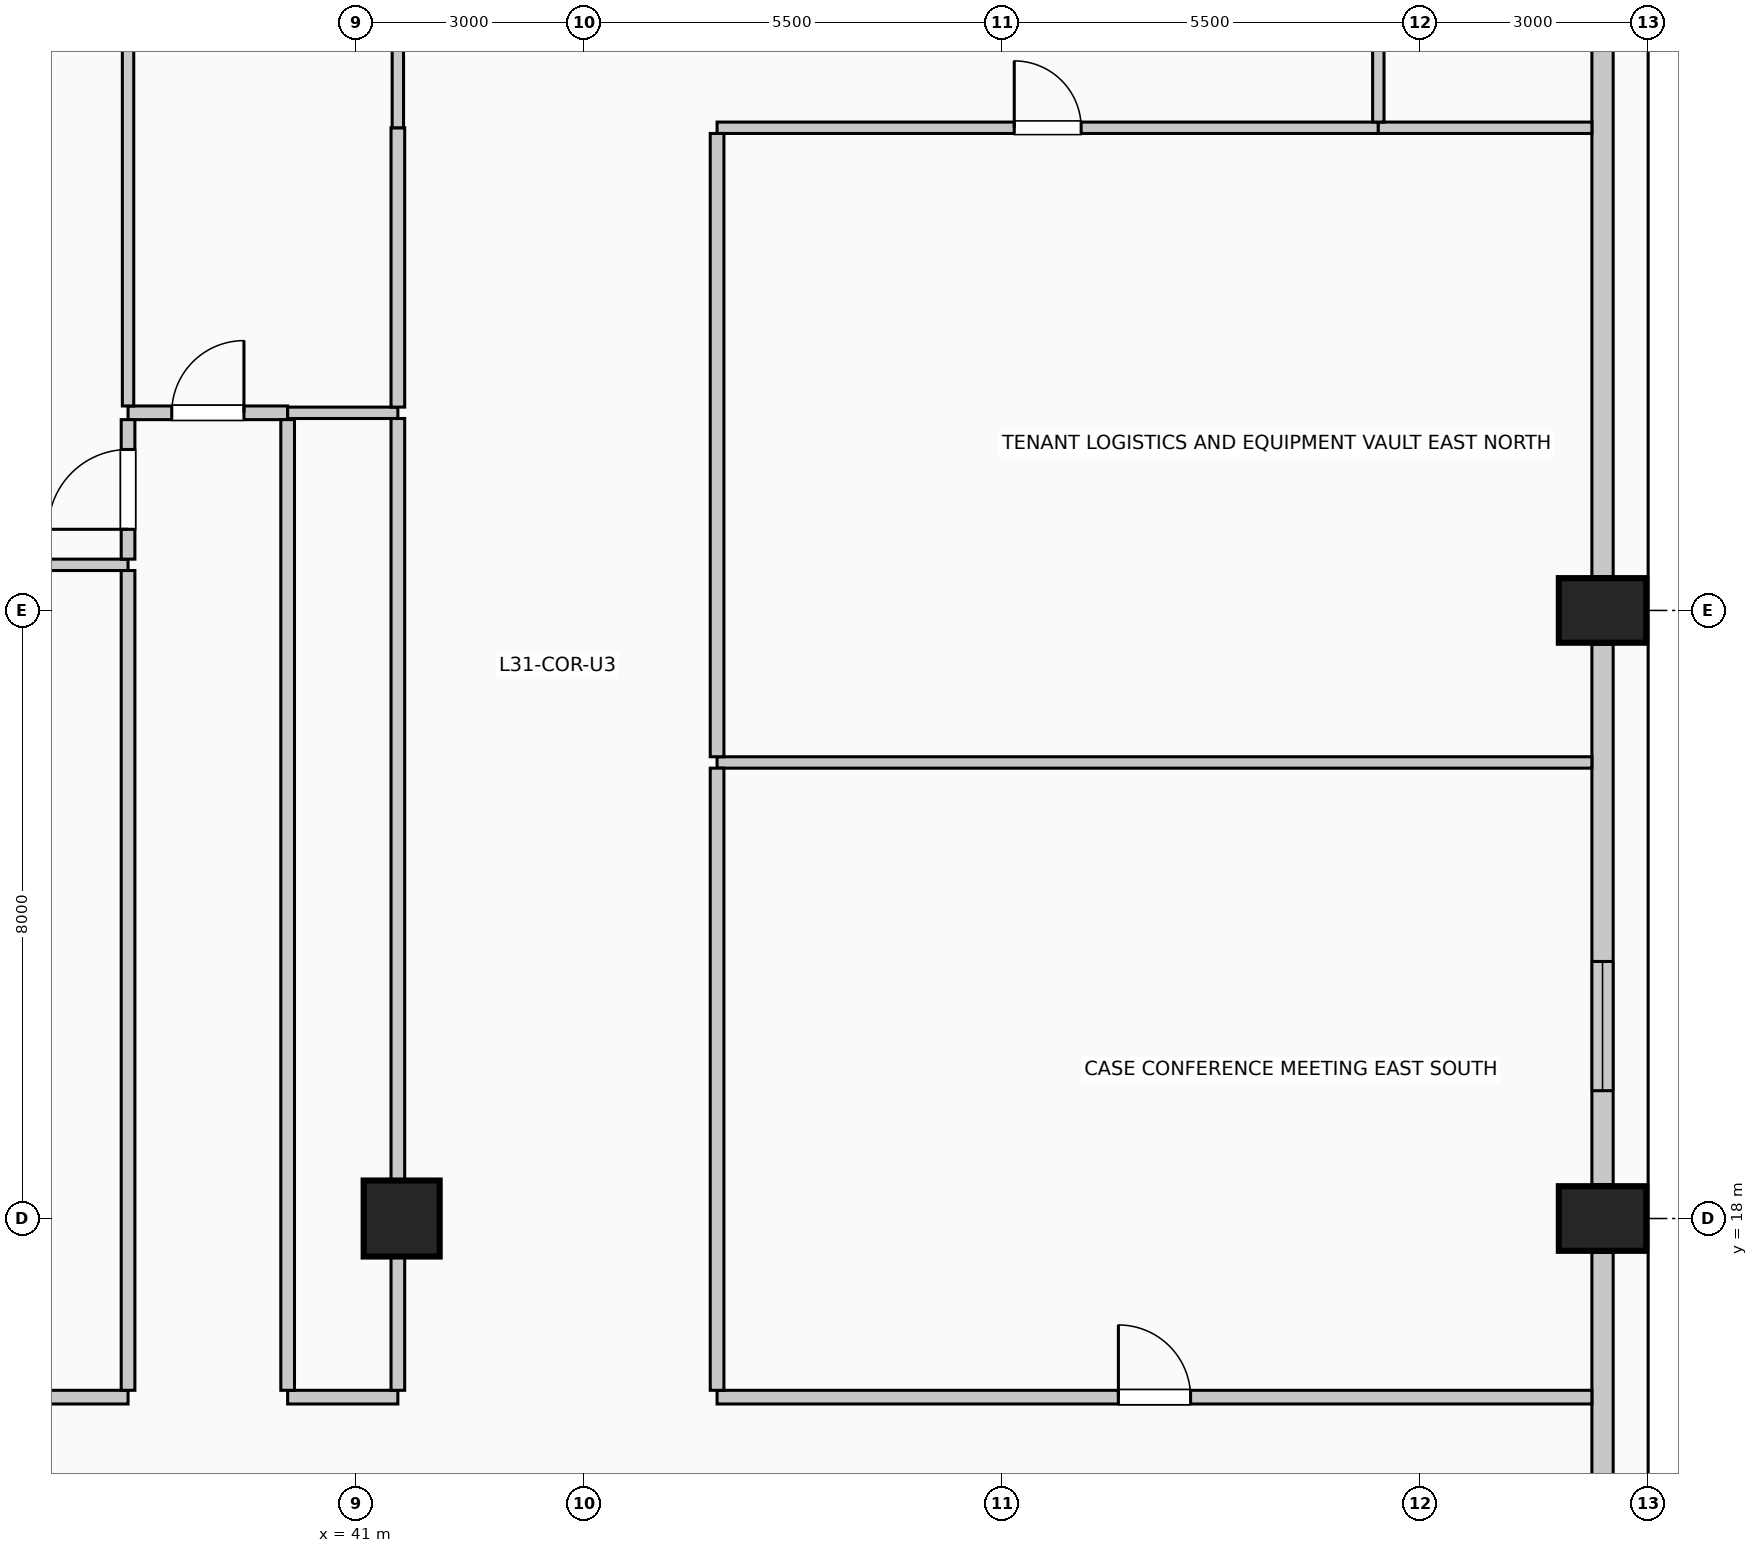
"""IFC4 building model, lengths in metres.
Left out: names, types, materials, properties, quantities, classifications, styles, units other than length and angle.
Written with IfcOpenShell. Run it as: python <this file> out.ifc"""

import sys

from ifc_helpers import new_model, si_unit, direction, frame, frame_2d, origin, origin_2d, place, context, subcontext, project, spatial, rectangle, circle, extrude, element, fill, save


model = new_model("IFC4")
c1 = context("Model", 3, precision=1e-05, world=origin(), true_north=direction((0.0, 1.0)))
c2 = subcontext(c1, "Body", "Model", "MODEL_VIEW")
j1 = project(units=[si_unit("LENGTHUNIT", "METRE"), si_unit("PLANEANGLEUNIT", "RADIAN")], contexts=[c1])
p1 = place(None, origin())
s1 = spatial("IfcSite", under=j1, at=p1, CompositionType="ELEMENT")
p2 = place(p1, origin())
s2 = spatial("IfcBuilding", under=s1, at=p2, CompositionType="ELEMENT")
p3 = place(p2, frame((0.0, 0.0, 128.6)))
s3 = spatial("IfcBuildingStorey", under=s2, at=p3, CompositionType="ELEMENT", Elevation=128.6)
for number, where, z_axis, x_axis in (
    (1, (57.4, 18.0, 0.0), (0.0, 0.0, 1.0), (0.0, 1.0, 0.0)),
    (2, (57.4, 26.0, 0.0), (0.0, 0.0, 1.0), (0.0, 1.0, 0.0)),
):
    element("IfcColumn", number, at=place(p3, frame(where, z_axis=z_axis, x_axis=x_axis)), inside=s3, PredefinedType="COLUMN", context=c2, shape_type="SweptSolid", body=[
        extrude(rectangle(XDim=0.85, YDim=1.15, at=origin_2d()), origin(), (0.0, 0.0, 1.0), 4.0),
    ])
p4 = place(p3, frame((41.6, 18.0, 0.0), z_axis=(0.0, 0.0, 1.0), x_axis=(1.0, 0.0, 0.0)))
e3 = element("IfcColumn", 3, at=p4, inside=s3, PredefinedType="COLUMN", context=c2, shape_type="SweptSolid", body=[
    extrude(circle(Radius=0.5, at=origin_2d()), origin(), (0.0, 0.0, 1.0), 4.0),
])
p5 = place(p3, frame((57.4, 17.555, 0.0), z_axis=(0.0, 0.0, 1.0), x_axis=(0.0, -1.0, 0.0)))
e4 = element("IfcWall", 4, at=p5, inside=s3, PredefinedType="SOLIDWALL", context=c2, shape_type="SweptSolid", body=[
    extrude(rectangle(XDim=7.11, YDim=0.28, at=frame_2d((3.555, 0.0))), origin(), (0.0, 0.0, 1.0), 2.875),
])
p6 = place(p3, frame((57.4, 25.555, 0.0), z_axis=(0.0, 0.0, 1.0), x_axis=(0.0, -1.0, 0.0)))
e5 = element("IfcWall", 5, at=p6, inside=s3, PredefinedType="SOLIDWALL", context=c2, shape_type="SweptSolid", body=[
    extrude(rectangle(XDim=7.11, YDim=0.28, at=frame_2d((3.555, 0.0))), origin(), (0.0, 0.0, 1.0), 2.875),
])
p7 = place(p6, frame((4.173, 0.0, 0.5)))
e6 = element("IfcOpeningElement", 6, at=p7, cuts=e5, PredefinedType="OPENING", context=c2, shape_type="SweptSolid", body=[
    extrude(rectangle(XDim=1.7, YDim=1.95, at=frame_2d((0.85, 0.975))), frame((0.0, 0.15, 0.0), z_axis=(0.0, -1.0, 0.0), x_axis=(1.0, 0.0, 0.0)), (0.0, 0.0, 1.0), 0.3),
])
p8 = place(p3, frame((57.4, 33.555, 0.0), z_axis=(0.0, 0.0, 1.0), x_axis=(0.0, -1.0, 0.0)))
e7 = element("IfcWall", 7, at=p8, inside=s3, PredefinedType="SOLIDWALL", context=c2, shape_type="SweptSolid", body=[
    extrude(rectangle(XDim=7.11, YDim=0.28, at=frame_2d((3.555, 0.0))), origin(), (0.0, 0.0, 1.0), 2.875),
])
p9 = place(p3, frame((16.65, 15.65, 0.0), z_axis=(0.0, 0.0, 1.0), x_axis=(1.0, 0.0, 0.0)))
e8 = element("IfcWall", 8, at=p9, inside=s3, PredefinedType="PARTITIONING", context=c2, shape_type="SweptSolid", body=[
    extrude(rectangle(XDim=21.35, YDim=0.18, at=frame_2d((10.675, 0.0))), origin(), (0.0, 0.0, 1.0), 3.725),
])
p10 = place(p9, frame((10.2, 0.0, 0.0)))
e9 = element("IfcOpeningElement", 9, at=p10, cuts=e8, PredefinedType="OPENING", context=c2, shape_type="SweptSolid", body=[
    extrude(rectangle(XDim=0.95, YDim=2.15, at=frame_2d((0.475, 1.075))), frame((0.0, 0.1, 0.0), z_axis=(0.0, -1.0, 0.0), x_axis=(1.0, 0.0, 0.0)), (0.0, 0.0, 1.0), 0.2),
])
p11 = place(p3, frame((40.1, 15.65, 0.0), z_axis=(0.0, 0.0, 1.0), x_axis=(1.0, 0.0, 0.0)))
e10 = element("IfcWall", 10, at=p11, inside=s3, PredefinedType="PARTITIONING", context=c2, shape_type="SweptSolid", body=[
    extrude(rectangle(XDim=1.45, YDim=0.18, at=frame_2d((0.725, 0.0))), origin(), (0.0, 0.0, 1.0), 3.725),
])
p12 = place(p3, frame((45.75, 15.65, 0.0), z_axis=(0.0, 0.0, 1.0), x_axis=(1.0, 0.0, 0.0)))
e11 = element("IfcWall", 11, at=p12, inside=s3, PredefinedType="PARTITIONING", context=c2, shape_type="SweptSolid", body=[
    extrude(rectangle(XDim=11.51, YDim=0.18, at=frame_2d((5.755, 0.0))), origin(), (0.0, 0.0, 1.0), 3.725),
])
p13 = place(p12, frame((5.28, 0.0, 0.0)))
e12 = element("IfcOpeningElement", 12, at=p13, cuts=e11, PredefinedType="OPENING", context=c2, shape_type="SweptSolid", body=[
    extrude(rectangle(XDim=0.95, YDim=2.15, at=frame_2d((0.475, 1.075))), frame((0.0, 0.1, 0.0), z_axis=(0.0, -1.0, 0.0), x_axis=(1.0, 0.0, 0.0)), (0.0, 0.0, 1.0), 0.2),
])
p14 = place(p3, frame((45.75, 24.0, 0.0), z_axis=(0.0, 0.0, 1.0), x_axis=(1.0, 0.0, 0.0)))
e13 = element("IfcWall", 13, at=p14, inside=s3, PredefinedType="PARTITIONING", context=c2, shape_type="SweptSolid", body=[
    extrude(rectangle(XDim=11.51, YDim=0.15, at=frame_2d((5.755, 0.0))), origin(), (0.0, 0.0, 1.0), 3.725),
])
p15 = place(p3, frame((16.65, 26.6, 0.0), z_axis=(0.0, 0.0, 1.0), x_axis=(1.0, 0.0, 0.0)))
e14 = element("IfcWall", 14, at=p15, inside=s3, PredefinedType="PARTITIONING", context=c2, shape_type="SweptSolid", body=[
    extrude(rectangle(XDim=21.35, YDim=0.15, at=frame_2d((10.675, 0.0))), origin(), (0.0, 0.0, 1.0), 3.725),
])
p16 = place(p3, frame((38.0, 28.6, 0.0), z_axis=(0.0, 0.0, 1.0), x_axis=(1.0, 0.0, 0.0)))
e15 = element("IfcWall", 15, at=p16, inside=s3, PredefinedType="PARTITIONING", context=c2, shape_type="SweptSolid", body=[
    extrude(rectangle(XDim=2.1, YDim=0.18, at=frame_2d((1.05, 0.0))), origin(), (0.0, 0.0, 1.0), 3.725),
])
p17 = place(p16, frame((0.575, 0.0, 0.0)))
e16 = element("IfcOpeningElement", 16, at=p17, cuts=e15, PredefinedType="OPENING", context=c2, shape_type="SweptSolid", body=[
    extrude(rectangle(XDim=0.95, YDim=2.15, at=frame_2d((0.475, 1.075))), frame((0.0, 0.1, 0.0), z_axis=(0.0, -1.0, 0.0), x_axis=(1.0, 0.0, 0.0)), (0.0, 0.0, 1.0), 0.2),
])
p18 = place(p3, frame((40.1, 28.6, 0.0), z_axis=(0.0, 0.0, 1.0), x_axis=(1.0, 0.0, 0.0)))
e17 = element("IfcWall", 17, at=p18, inside=s3, PredefinedType="PARTITIONING", context=c2, shape_type="SweptSolid", body=[
    extrude(rectangle(XDim=1.45, YDim=0.15, at=frame_2d((0.725, 0.0))), origin(), (0.0, 0.0, 1.0), 3.725),
])
p19 = place(p3, frame((45.75, 32.35, 0.0), z_axis=(0.0, 0.0, 1.0), x_axis=(1.0, 0.0, 0.0)))
e18 = element("IfcWall", 18, at=p19, inside=s3, PredefinedType="PARTITIONING", context=c2, shape_type="SweptSolid", body=[
    extrude(rectangle(XDim=8.7, YDim=0.15, at=frame_2d((4.35, 0.0))), origin(), (0.0, 0.0, 1.0), 3.725),
])
p20 = place(p19, frame((3.91, 0.0, 0.0)))
e19 = element("IfcOpeningElement", 19, at=p20, cuts=e18, PredefinedType="OPENING", context=c2, shape_type="SweptSolid", body=[
    extrude(rectangle(XDim=0.88, YDim=2.1, at=frame_2d((0.44, 1.05))), frame((0.0, 0.085, 0.0), z_axis=(0.0, -1.0, 0.0), x_axis=(1.0, 0.0, 0.0)), (0.0, 0.0, 1.0), 0.17),
])
p21 = place(p3, frame((54.45, 32.35, 0.0), z_axis=(0.0, 0.0, 1.0), x_axis=(1.0, 0.0, 0.0)))
e20 = element("IfcWall", 20, at=p21, inside=s3, PredefinedType="PARTITIONING", context=c2, shape_type="SweptSolid", body=[
    extrude(rectangle(XDim=2.81, YDim=0.15, at=frame_2d((1.405, 0.0))), origin(), (0.0, 0.0, 1.0), 3.725),
])
p22 = place(p3, frame((38.0, 15.74, 0.0), z_axis=(0.0, 0.0, 1.0), x_axis=(0.0, 1.0, 0.0)))
e21 = element("IfcWall", 21, at=p22, inside=s3, PredefinedType="PARTITIONING", context=c2, shape_type="SweptSolid", body=[
    extrude(rectangle(XDim=10.785, YDim=0.18, at=frame_2d((5.393, 0.0))), origin(), (0.0, 0.0, 1.0), 3.725),
])
p23 = place(p3, frame((38.0, 26.675, 0.0), z_axis=(0.0, 0.0, 1.0), x_axis=(0.0, 1.0, 0.0)))
e22 = element("IfcWall", 22, at=p23, inside=s3, PredefinedType="PARTITIONING", context=c2, shape_type="SweptSolid", body=[
    extrude(rectangle(XDim=1.835, YDim=0.18, at=frame_2d((0.917, 0.0))), origin(), (0.0, 0.0, 1.0), 3.725),
])
p24 = place(p23, frame((0.393, 0.0, 0.0)))
e23 = element("IfcOpeningElement", 23, at=p24, cuts=e22, PredefinedType="OPENING", context=c2, shape_type="SweptSolid", body=[
    extrude(rectangle(XDim=1.05, YDim=2.15, at=frame_2d((0.525, 1.075))), frame((0.0, 0.1, 0.0), z_axis=(0.0, -1.0, 0.0), x_axis=(1.0, 0.0, 0.0)), (0.0, 0.0, 1.0), 0.2),
])
p25 = place(p3, frame((38.0, 28.69, 0.0), z_axis=(0.0, 0.0, 1.0), x_axis=(0.0, 1.0, 0.0)))
e24 = element("IfcWall", 24, at=p25, inside=s3, PredefinedType="PARTITIONING", context=c2, shape_type="SweptSolid", body=[
    extrude(rectangle(XDim=16.57, YDim=0.15, at=frame_2d((8.285, 0.0))), origin(), (0.0, 0.0, 1.0), 3.725),
])
p26 = place(p3, frame((40.1, 15.74, 0.0), z_axis=(0.0, 0.0, 1.0), x_axis=(0.0, 1.0, 0.0)))
e25 = element("IfcWall", 25, at=p26, inside=s3, PredefinedType="PARTITIONING", context=c2, shape_type="SweptSolid", body=[
    extrude(rectangle(XDim=12.77, YDim=0.18, at=frame_2d((6.385, 0.0))), origin(), (0.0, 0.0, 1.0), 3.725),
])
p27 = place(p3, frame((41.55, 15.74, 0.0), z_axis=(0.0, 0.0, 1.0), x_axis=(0.0, 1.0, 0.0)))
e26 = element("IfcWall", 26, at=p27, inside=s3, PredefinedType="PARTITIONING", context=c2, shape_type="SweptSolid", body=[
    extrude(rectangle(XDim=1.76, YDim=0.18, at=frame_2d((0.88, 0.0))), origin(), (0.0, 0.0, 1.0), 3.07),
])
p28 = place(p3, frame((41.55, 18.5, 0.0), z_axis=(0.0, 0.0, 1.0), x_axis=(0.0, 1.0, 0.0)))
e27 = element("IfcWall", 27, at=p28, inside=s3, PredefinedType="PARTITIONING", context=c2, shape_type="SweptSolid", body=[
    extrude(rectangle(XDim=10.025, YDim=0.18, at=frame_2d((5.012, 0.0))), origin(), (0.0, 0.0, 1.0), 3.07),
])
p29 = place(p3, frame((41.55, 28.675, 0.0), z_axis=(0.0, 0.0, 1.0), x_axis=(0.0, 1.0, 0.0)))
e28 = element("IfcWall", 28, at=p29, inside=s3, PredefinedType="PARTITIONING", context=c2, shape_type="SweptSolid", body=[
    extrude(rectangle(XDim=3.675, YDim=0.18, at=frame_2d((1.837, 0.0))), origin(), (0.0, 0.0, 1.0), 3.07),
])
p30 = place(p3, frame((41.55, 32.35, 0.0), z_axis=(0.0, 0.0, 1.0), x_axis=(0.0, 1.0, 0.0)))
e29 = element("IfcWall", 29, at=p30, inside=s3, PredefinedType="PARTITIONING", context=c2, shape_type="SweptSolid", body=[
    extrude(rectangle(XDim=1.15, YDim=0.15, at=frame_2d((0.575, 0.0))), origin(), (0.0, 0.0, 1.0), 3.07),
])
p31 = place(p3, frame((45.75, 15.74, 0.0), z_axis=(0.0, 0.0, 1.0), x_axis=(0.0, 1.0, 0.0)))
e30 = element("IfcWall", 30, at=p31, inside=s3, PredefinedType="PARTITIONING", context=c2, shape_type="SweptSolid", body=[
    extrude(rectangle(XDim=8.185, YDim=0.18, at=frame_2d((4.093, 0.0))), origin(), (0.0, 0.0, 1.0), 3.725),
])
p32 = place(p3, frame((45.75, 24.075, 0.0), z_axis=(0.0, 0.0, 1.0), x_axis=(0.0, 1.0, 0.0)))
e31 = element("IfcWall", 31, at=p32, inside=s3, PredefinedType="PARTITIONING", context=c2, shape_type="SweptSolid", body=[
    extrude(rectangle(XDim=8.2, YDim=0.18, at=frame_2d((4.1, 0.0))), origin(), (0.0, 0.0, 1.0), 3.725),
])
p33 = place(p3, frame((54.45, 32.425, 0.0), z_axis=(0.0, 0.0, 1.0), x_axis=(0.0, 1.0, 0.0)))
e32 = element("IfcWall", 32, at=p33, inside=s3, PredefinedType="PARTITIONING", context=c2, shape_type="SweptSolid", body=[
    extrude(rectangle(XDim=1.725, YDim=0.15, at=frame_2d((0.862, 0.0))), origin(), (0.0, 0.0, 1.0), 3.725),
])
p34 = place(p7, origin())
e33 = element("IfcWindow", 33, at=p34, inside=s3, PartitioningType="SINGLE_PANEL", PredefinedType="WINDOW", context=c2, shape_type="SweptSolid", body=[
    extrude(rectangle(XDim=1.7, YDim=1.95, at=frame_2d((0.85, 0.975))), frame((0.0, 0.03, 0.0), z_axis=(0.0, -1.0, 0.0), x_axis=(1.0, 0.0, 0.0)), (0.0, 0.0, 1.0), 0.06),
])
fill(e6, e33)
p35 = place(p13, origin())
e34 = element("IfcDoor", 34, at=p35, inside=s3, OperationType="SINGLE_SWING_LEFT", PredefinedType="DOOR", context=c2, shape_type="SweptSolid", body=[
    extrude(rectangle(XDim=0.95, YDim=2.15, at=frame_2d((0.475, 1.075))), frame((0.0, 0.025, 0.0), z_axis=(0.0, -1.0, 0.0), x_axis=(1.0, 0.0, 0.0)), (0.0, 0.0, 1.0), 0.05),
])
fill(e12, e34)
p36 = place(p17, origin())
e35 = element("IfcDoor", 35, at=p36, inside=s3, OperationType="SINGLE_SWING_RIGHT", PredefinedType="DOOR", context=c2, shape_type="SweptSolid", body=[
    extrude(rectangle(XDim=0.95, YDim=2.15, at=frame_2d((0.475, 1.075))), frame((0.0, 0.025, 0.0), z_axis=(0.0, -1.0, 0.0), x_axis=(1.0, 0.0, 0.0)), (0.0, 0.0, 1.0), 0.05),
])
fill(e16, e35)
p37 = place(p20, origin())
e36 = element("IfcDoor", 36, at=p37, inside=s3, OperationType="SINGLE_SWING_LEFT", PredefinedType="DOOR", context=c2, shape_type="SweptSolid", body=[
    extrude(rectangle(XDim=0.88, YDim=2.1, at=frame_2d((0.44, 1.05))), frame((0.0, 0.025, 0.0), z_axis=(0.0, -1.0, 0.0), x_axis=(1.0, 0.0, 0.0)), (0.0, 0.0, 1.0), 0.05),
])
fill(e19, e36)
p38 = place(p24, origin())
e37 = element("IfcDoor", 37, at=p38, inside=s3, OperationType="SINGLE_SWING_LEFT", PredefinedType="DOOR", context=c2, shape_type="SweptSolid", body=[
    extrude(rectangle(XDim=1.05, YDim=2.15, at=frame_2d((0.525, 1.075))), frame((0.0, 0.025, 0.0), z_axis=(0.0, -1.0, 0.0), x_axis=(1.0, 0.0, 0.0)), (0.0, 0.0, 1.0), 0.05),
])
fill(e23, e37)
save(model, sys.argv[1])
